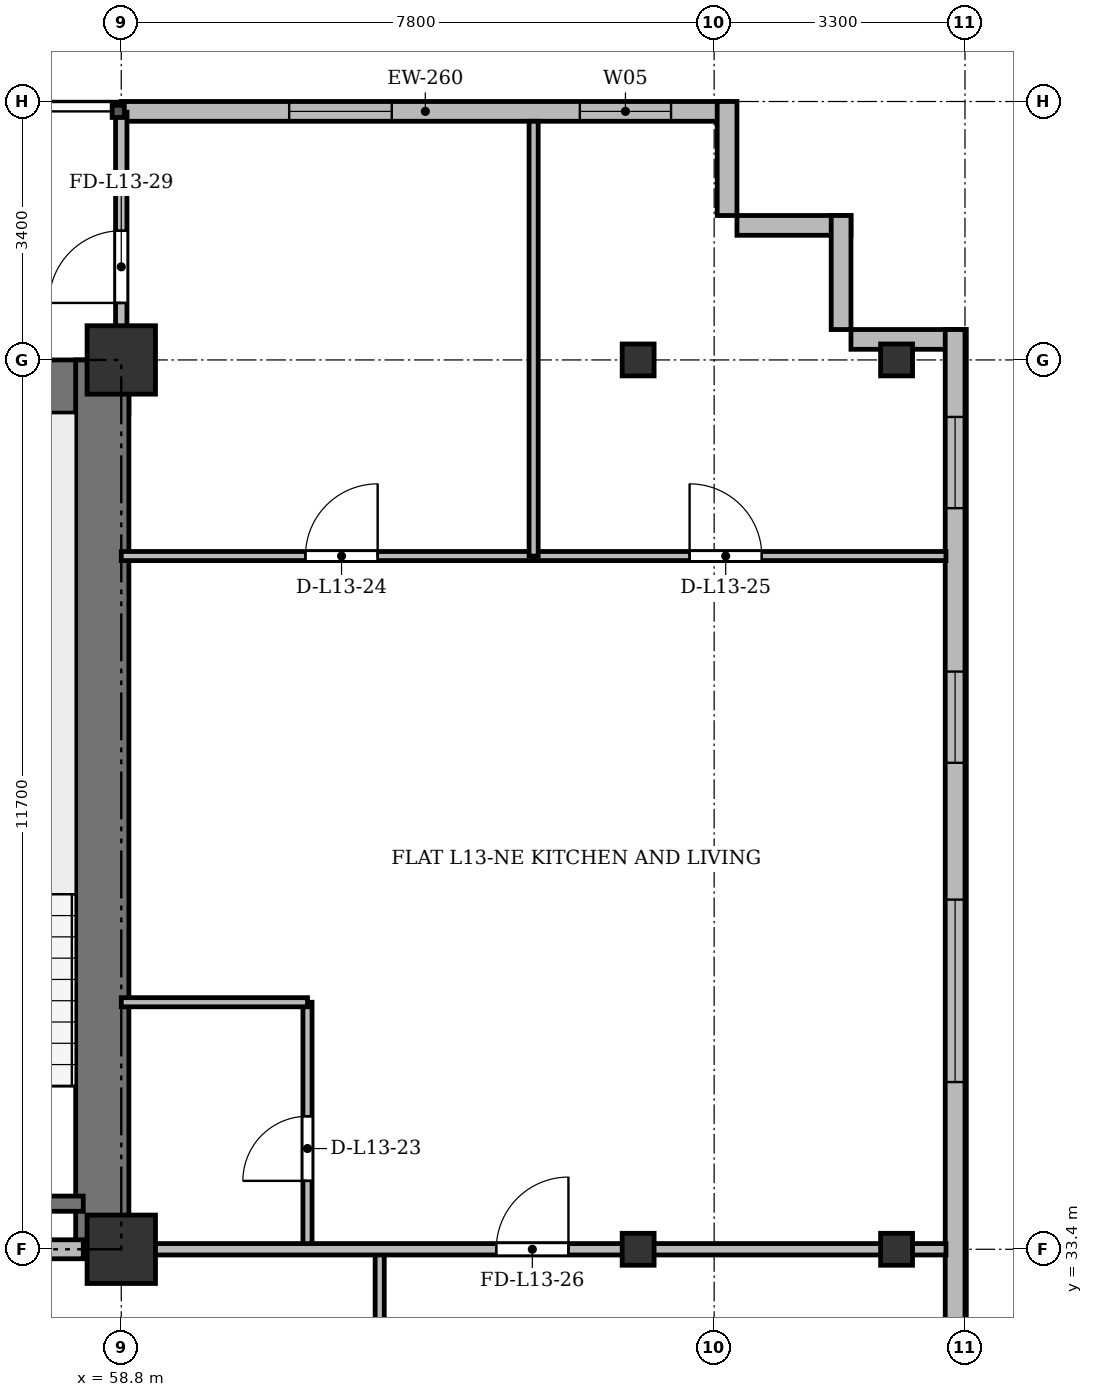
"""IFC4 building model, lengths in metres.
Left out: names, types, materials, properties, quantities, classifications, styles, units other than length and angle.
Written with IfcOpenShell. Run it as: python <this file> out.ifc"""

import sys

from ifc_helpers import new_model, si_unit, direction, frame, frame_2d, origin, origin_2d, place, context, subcontext, project, spatial, rectangle, i_section, extrude, source, transform, mapped, element, fill, save


model = new_model("IFC4")
c1 = context("Model", 3, precision=1e-05, world=origin(), true_north=direction((0.0, 1.0)))
c2 = subcontext(c1, "Body", "Model", "MODEL_VIEW")
j1 = project(units=[si_unit("LENGTHUNIT", "METRE"), si_unit("PLANEANGLEUNIT", "RADIAN")], contexts=[c1])
p1 = place(None, origin())
s1 = spatial("IfcSite", under=j1, at=p1, CompositionType="ELEMENT")
p2 = place(p1, origin())
s2 = spatial("IfcBuilding", under=s1, at=p2, CompositionType="ELEMENT")
p3 = place(p2, frame((0.0, 0.0, 52.3)))
s3 = spatial("IfcBuildingStorey", under=s2, at=p3, CompositionType="ELEMENT", Elevation=52.3)
m1 = source(origin(), c2, "Body", "SweptSolid", [
    extrude(rectangle(XDim=0.9, YDim=0.9, at=origin_2d()), origin(), (0.0, 0.0, 1.0), 3.6),
])
for number, where, z_axis, x_axis in (
    (1, (58.8, 33.4, 0.0), (0.0, 0.0, 1.0), (1.0, 0.0, 0.0)),
    (2, (58.8, 45.1, 0.0), (0.0, 0.0, 1.0), (1.0, 0.0, 0.0)),
):
    element("IfcColumn", number, at=place(p3, frame(where, z_axis=z_axis, x_axis=x_axis)), inside=s3, PredefinedType="COLUMN", context=c2, shape_type="MappedRepresentation", body=[
        mapped(m1, transform((0.0, 0.0, 0.0), x_axis=(1.0, 0.0, 0.0), y_axis=(0.0, 1.0, 0.0), z_axis=(0.0, 0.0, 1.0), scale=1.0)),
    ])
m2 = source(origin(), c2, "Body", "SweptSolid", [
    extrude(i_section(OverallWidth=0.42, OverallDepth=0.42, WebThickness=0.026, FlangeThickness=0.04, at=origin_2d()), origin(), (0.0, 0.0, 1.0), 3.6),
])
for number, where, z_axis, x_axis in (
    (3, (65.6, 33.4, 0.0), (0.0, 0.0, 1.0), (1.0, 0.0, 0.0)),
    (4, (65.6, 45.1, 0.0), (0.0, 0.0, 1.0), (1.0, 0.0, 0.0)),
    (5, (69.0, 33.4, 0.0), (0.0, 0.0, 1.0), (1.0, 0.0, 0.0)),
    (6, (69.0, 45.1, 0.0), (0.0, 0.0, 1.0), (1.0, 0.0, 0.0)),
):
    element("IfcColumn", number, at=place(p3, frame(where, z_axis=z_axis, x_axis=x_axis)), inside=s3, PredefinedType="COLUMN", context=c2, shape_type="MappedRepresentation", body=[
        mapped(m2, transform((0.0, 0.0, 0.0), x_axis=(1.0, 0.0, 0.0), y_axis=(0.0, 1.0, 0.0), z_axis=(0.0, 0.0, 1.0), scale=1.0)),
    ])
p4 = place(p3, frame((58.8, 48.37, 0.0), z_axis=(0.0, 0.0, 1.0), x_axis=(1.0, 0.0, 0.0)))
e7 = element("IfcWall", 7, at=p4, inside=s3, PredefinedType="SOLIDWALL", context=c2, shape_type="SweptSolid", body=[
    extrude(rectangle(XDim=8.0, YDim=0.26, at=frame_2d((4.0, 0.0))), origin(), (0.0, 0.0, 1.0), 3.34),
])
p5 = place(p4, frame((2.209, 0.0, 0.9)))
e8 = element("IfcOpeningElement", 8, at=p5, cuts=e7, PredefinedType="OPENING", context=c2, shape_type="SweptSolid", body=[
    extrude(rectangle(XDim=1.35, YDim=1.5, at=frame_2d((0.675, 0.75))), frame((0.0, 0.14, 0.0), z_axis=(0.0, -1.0, 0.0), x_axis=(1.0, 0.0, 0.0)), (0.0, 0.0, 1.0), 0.28),
])
p6 = place(p4, frame((6.033, 0.0, 0.9)))
e9 = element("IfcOpeningElement", 9, at=p6, cuts=e7, PredefinedType="OPENING", context=c2, shape_type="SweptSolid", body=[
    extrude(rectangle(XDim=1.2, YDim=1.65, at=frame_2d((0.6, 0.825))), frame((0.0, 0.14, 0.0), z_axis=(0.0, -1.0, 0.0), x_axis=(1.0, 0.0, 0.0)), (0.0, 0.0, 1.0), 0.28),
])
for number, where, z_axis, x_axis in (
    (10, (66.77, 48.5, 0.0), (0.0, 0.0, 1.0), (0.0, -1.0, 0.0)),
    (11, (66.9, 46.87, 0.0), (0.0, 0.0, 1.0), (1.0, 0.0, 0.0)),
    (12, (68.27, 47.0, 0.0), (0.0, 0.0, 1.0), (0.0, -1.0, 0.0)),
):
    element("IfcWall", number, at=place(p3, frame(where, z_axis=z_axis, x_axis=x_axis)), inside=s3, PredefinedType="SOLIDWALL", context=c2, shape_type="SweptSolid", body=[
        extrude(rectangle(XDim=1.5, YDim=0.26, at=frame_2d((0.75, 0.0))), origin(), (0.0, 0.0, 1.0), 3.34),
    ])
p7 = place(p3, frame((68.4, 45.37, 0.0), z_axis=(0.0, 0.0, 1.0), x_axis=(1.0, 0.0, 0.0)))
e13 = element("IfcWall", 13, at=p7, inside=s3, PredefinedType="SOLIDWALL", context=c2, shape_type="SweptSolid", body=[
    extrude(rectangle(XDim=1.5, YDim=0.26, at=frame_2d((0.75, 0.0))), origin(), (0.0, 0.0, 1.0), 2.69),
])
p8 = place(p3, frame((69.77, 45.5, 0.0), z_axis=(0.0, 0.0, 1.0), x_axis=(0.0, -1.0, 0.0)))
e14 = element("IfcWall", 14, at=p8, inside=s3, PredefinedType="SOLIDWALL", context=c2, shape_type="SweptSolid", body=[
    extrude(rectangle(XDim=39.6, YDim=0.26, at=frame_2d((19.8, 0.0))), origin(), (0.0, 0.0, 1.0), 3.34),
])
p9 = place(p8, frame((36.95, 0.0, 0.92)))
e15 = element("IfcOpeningElement", 15, at=p9, cuts=e14, PredefinedType="OPENING", context=c2, shape_type="SweptSolid", body=[
    extrude(rectangle(XDim=1.2, YDim=1.65, at=frame_2d((0.6, 0.825))), frame((0.0, 0.14, 0.0), z_axis=(0.0, -1.0, 0.0), x_axis=(1.0, 0.0, 0.0)), (0.0, 0.0, 1.0), 0.28),
])
p10 = place(p8, frame((32.9, 0.0, 0.92)))
e16 = element("IfcOpeningElement", 16, at=p10, cuts=e14, PredefinedType="OPENING", context=c2, shape_type="SweptSolid", body=[
    extrude(rectangle(XDim=2.4, YDim=2.1, at=frame_2d((1.2, 1.05))), frame((0.0, 0.14, 0.0), z_axis=(0.0, -1.0, 0.0), x_axis=(1.0, 0.0, 0.0)), (0.0, 0.0, 1.0), 0.28),
])
p11 = place(p8, frame((28.7, 0.0, 0.92)))
e17 = element("IfcOpeningElement", 17, at=p11, cuts=e14, PredefinedType="OPENING", context=c2, shape_type="SweptSolid", body=[
    extrude(rectangle(XDim=2.4, YDim=2.1, at=frame_2d((1.2, 1.05))), frame((0.0, 0.14, 0.0), z_axis=(0.0, -1.0, 0.0), x_axis=(1.0, 0.0, 0.0)), (0.0, 0.0, 1.0), 0.28),
])
p12 = place(p8, frame((21.5, 0.0, 0.92)))
e18 = element("IfcOpeningElement", 18, at=p12, cuts=e14, PredefinedType="OPENING", context=c2, shape_type="SweptSolid", body=[
    extrude(rectangle(XDim=2.4, YDim=2.1, at=frame_2d((1.2, 1.05))), frame((0.0, 0.14, 0.0), z_axis=(0.0, -1.0, 0.0), x_axis=(1.0, 0.0, 0.0)), (0.0, 0.0, 1.0), 0.28),
])
p13 = place(p8, frame((7.5, 0.0, 0.92)))
e19 = element("IfcOpeningElement", 19, at=p13, cuts=e14, PredefinedType="OPENING", context=c2, shape_type="SweptSolid", body=[
    extrude(rectangle(XDim=2.4, YDim=2.1, at=frame_2d((1.2, 1.05))), frame((0.0, 0.14, 0.0), z_axis=(0.0, -1.0, 0.0), x_axis=(1.0, 0.0, 0.0)), (0.0, 0.0, 1.0), 0.28),
])
p14 = place(p8, frame((4.5, 0.0, 0.92)))
e20 = element("IfcOpeningElement", 20, at=p14, cuts=e14, PredefinedType="OPENING", context=c2, shape_type="SweptSolid", body=[
    extrude(rectangle(XDim=1.2, YDim=1.65, at=frame_2d((0.6, 0.825))), frame((0.0, 0.14, 0.0), z_axis=(0.0, -1.0, 0.0), x_axis=(1.0, 0.0, 0.0)), (0.0, 0.0, 1.0), 0.28),
])
p15 = place(p8, frame((1.15, 0.0, 0.92)))
e21 = element("IfcOpeningElement", 21, at=p15, cuts=e14, PredefinedType="OPENING", context=c2, shape_type="SweptSolid", body=[
    extrude(rectangle(XDim=1.2, YDim=1.65, at=frame_2d((0.6, 0.825))), frame((0.0, 0.14, 0.0), z_axis=(0.0, -1.0, 0.0), x_axis=(1.0, 0.0, 0.0)), (0.0, 0.0, 1.0), 0.28),
])
p16 = place(p3, frame((15.5, 44.75, 0.0), z_axis=(0.0, 0.0, 1.0), x_axis=(1.0, 0.0, 0.0)))
e22 = element("IfcWall", 22, at=p16, inside=s3, PredefinedType="SHEAR", context=c2, shape_type="SweptSolid", body=[
    extrude(rectangle(XDim=43.4, YDim=0.7, at=frame_2d((21.7, 0.0))), origin(), (0.0, 0.0, 1.0), 3.34),
])
p17 = place(p3, frame((58.55, 33.4, 0.0), z_axis=(0.0, 0.0, 1.0), x_axis=(0.0, 1.0, 0.0)))
e23 = element("IfcWall", 23, at=p17, inside=s3, PredefinedType="SHEAR", context=c2, shape_type="SweptSolid", body=[
    extrude(rectangle(XDim=11.7, YDim=0.7, at=frame_2d((5.85, 0.0))), origin(), (0.0, 0.0, 1.0), 3.34),
])
p18 = place(p3, frame((54.9, 34.0, 0.0), z_axis=(0.0, 0.0, 1.0), x_axis=(1.0, 0.0, 0.0)))
e24 = element("IfcWall", 24, at=p18, inside=s3, PredefinedType="SHEAR", context=c2, shape_type="SweptSolid", body=[
    extrude(rectangle(XDim=3.4, YDim=0.2, at=frame_2d((1.7, 0.0))), origin(), (0.0, 0.0, 1.0), 3.34),
])
p19 = place(p3, frame((47.15, 33.4, 0.0), z_axis=(0.0, 0.0, 1.0), x_axis=(1.0, 0.0, 0.0)))
e25 = element("IfcWall", 25, at=p19, inside=s3, PredefinedType="PARTITIONING", context=c2, shape_type="SweptSolid", body=[
    extrude(rectangle(XDim=11.15, YDim=0.25, at=frame_2d((5.575, 0.0))), origin(), (0.0, 0.0, 1.0), 2.69),
])
p20 = place(p19, frame((0.7, 0.0, 0.0)))
e26 = element("IfcOpeningElement", 26, at=p20, cuts=e25, PredefinedType="OPENING", context=c2, shape_type="SweptSolid", body=[
    extrude(rectangle(XDim=0.95, YDim=2.15, at=frame_2d((0.475, 1.075))), frame((0.0, 0.135, 0.0), z_axis=(0.0, -1.0, 0.0), x_axis=(1.0, 0.0, 0.0)), (0.0, 0.0, 1.0), 0.27),
])
p21 = place(p19, frame((6.0, 0.0, 0.0)))
e27 = element("IfcOpeningElement", 27, at=p21, cuts=e25, PredefinedType="OPENING", context=c2, shape_type="SweptSolid", body=[
    extrude(rectangle(XDim=1.2, YDim=2.15, at=frame_2d((0.6, 1.075))), frame((0.0, 0.135, 0.0), z_axis=(0.0, -1.0, 0.0), x_axis=(1.0, 0.0, 0.0)), (0.0, 0.0, 1.0), 0.27),
])
p22 = place(p3, frame((62.2, 29.8, 0.0), z_axis=(0.0, 0.0, 1.0), x_axis=(0.0, 1.0, 0.0)))
e28 = element("IfcWall", 28, at=p22, inside=s3, PredefinedType="PARTITIONING", context=c2, shape_type="SweptSolid", body=[
    extrude(rectangle(XDim=3.6, YDim=0.12, at=frame_2d((1.8, 0.0))), origin(), (0.0, 0.0, 1.0), 2.69),
])
p23 = place(p3, frame((61.25, 33.4, 0.0), z_axis=(0.0, 0.0, 1.0), x_axis=(0.0, 1.0, 0.0)))
e29 = element("IfcWall", 29, at=p23, inside=s3, PredefinedType="PARTITIONING", context=c2, shape_type="SweptSolid", body=[
    extrude(rectangle(XDim=3.25, YDim=0.12, at=frame_2d((1.625, 0.0))), origin(), (0.0, 0.0, 1.0), 2.69),
])
p24 = place(p23, frame((0.9, 0.0, 0.0)))
e30 = element("IfcOpeningElement", 30, at=p24, cuts=e29, PredefinedType="OPENING", context=c2, shape_type="SweptSolid", body=[
    extrude(rectangle(XDim=0.85, YDim=2.1, at=frame_2d((0.425, 1.05))), frame((0.0, 0.07, 0.0), z_axis=(0.0, -1.0, 0.0), x_axis=(1.0, 0.0, 0.0)), (0.0, 0.0, 1.0), 0.14),
])
p25 = place(p3, frame((58.8, 36.65, 0.0), z_axis=(0.0, 0.0, 1.0), x_axis=(1.0, 0.0, 0.0)))
e31 = element("IfcWall", 31, at=p25, inside=s3, PredefinedType="PARTITIONING", context=c2, shape_type="SweptSolid", body=[
    extrude(rectangle(XDim=2.45, YDim=0.12, at=frame_2d((1.225, 0.0))), origin(), (0.0, 0.0, 1.0), 2.752),
])
p26 = place(p3, frame((58.8, 42.52, 0.0), z_axis=(0.0, 0.0, 1.0), x_axis=(1.0, 0.0, 0.0)))
e32 = element("IfcWall", 32, at=p26, inside=s3, PredefinedType="PARTITIONING", context=c2, shape_type="SweptSolid", body=[
    extrude(rectangle(XDim=5.425, YDim=0.12, at=frame_2d((2.712, 0.0))), origin(), (0.0, 0.0, 1.0), 2.752),
])
p27 = place(p26, frame((2.423, 0.0, 0.0)))
e33 = element("IfcOpeningElement", 33, at=p27, cuts=e32, PredefinedType="OPENING", context=c2, shape_type="SweptSolid", body=[
    extrude(rectangle(XDim=0.95, YDim=2.15, at=frame_2d((0.475, 1.075))), frame((0.0, 0.07, 0.0), z_axis=(0.0, -1.0, 0.0), x_axis=(1.0, 0.0, 0.0)), (0.0, 0.0, 1.0), 0.14),
])
p28 = place(p3, frame((64.225, 42.52, 0.0), z_axis=(0.0, 0.0, 1.0), x_axis=(1.0, 0.0, 0.0)))
e34 = element("IfcWall", 34, at=p28, inside=s3, PredefinedType="PARTITIONING", context=c2, shape_type="SweptSolid", body=[
    extrude(rectangle(XDim=5.425, YDim=0.12, at=frame_2d((2.712, 0.0))), origin(), (0.0, 0.0, 1.0), 2.752),
])
p29 = place(p28, frame((2.052, 0.0, 0.0)))
e35 = element("IfcOpeningElement", 35, at=p29, cuts=e34, PredefinedType="OPENING", context=c2, shape_type="SweptSolid", body=[
    extrude(rectangle(XDim=0.95, YDim=2.15, at=frame_2d((0.475, 1.075))), frame((0.0, 0.07, 0.0), z_axis=(0.0, -1.0, 0.0), x_axis=(1.0, 0.0, 0.0)), (0.0, 0.0, 1.0), 0.14),
])
p30 = place(p3, frame((64.225, 42.52, 0.0), z_axis=(0.0, 0.0, 1.0), x_axis=(0.0, 1.0, 0.0)))
e36 = element("IfcWall", 36, at=p30, inside=s3, PredefinedType="PARTITIONING", context=c2, shape_type="SweptSolid", body=[
    extrude(rectangle(XDim=5.72, YDim=0.12, at=frame_2d((2.86, 0.0))), origin(), (0.0, 0.0, 1.0), 2.69),
])
p31 = place(p3, frame((58.8, 33.4, 0.0), z_axis=(0.0, 0.0, 1.0), x_axis=(1.0, 0.0, 0.0)))
e37 = element("IfcWall", 37, at=p31, inside=s3, PredefinedType="PARTITIONING", context=c2, shape_type="SweptSolid", body=[
    extrude(rectangle(XDim=10.85, YDim=0.15, at=frame_2d((5.425, 0.0))), origin(), (0.0, 0.0, 1.0), 2.69),
])
p32 = place(p31, frame((4.933, 0.0, 0.0)))
e38 = element("IfcOpeningElement", 38, at=p32, cuts=e37, PredefinedType="OPENING", context=c2, shape_type="SweptSolid", body=[
    extrude(rectangle(XDim=0.95, YDim=2.15, at=frame_2d((0.475, 1.075))), frame((0.0, 0.085, 0.0), z_axis=(0.0, -1.0, 0.0), x_axis=(1.0, 0.0, 0.0)), (0.0, 0.0, 1.0), 0.17),
])
p33 = place(p3, frame((58.8, 44.75, 0.0), z_axis=(0.0, 0.0, 1.0), x_axis=(0.0, 1.0, 0.0)))
e39 = element("IfcWall", 39, at=p33, inside=s3, PredefinedType="PARTITIONING", context=c2, shape_type="SweptSolid", body=[
    extrude(rectangle(XDim=3.61, YDim=0.15, at=frame_2d((1.805, 0.0))), origin(), (0.0, 0.0, 1.0), 2.752),
])
p34 = place(p33, frame((1.1, 0.0, 0.0)))
e40 = element("IfcOpeningElement", 40, at=p34, cuts=e39, PredefinedType="OPENING", context=c2, shape_type="SweptSolid", body=[
    extrude(rectangle(XDim=0.95, YDim=2.15, at=frame_2d((0.475, 1.075))), frame((0.0, 0.085, 0.0), z_axis=(0.0, -1.0, 0.0), x_axis=(1.0, 0.0, 0.0)), (0.0, 0.0, 1.0), 0.17),
])
m3 = source(origin(), c2, "Body", "SweptSolid", [
    extrude(rectangle(XDim=1.35, YDim=1.5, at=frame_2d((0.675, 0.75))), frame((0.0, 0.03, 0.0), z_axis=(0.0, -1.0, 0.0), x_axis=(1.0, 0.0, 0.0)), (0.0, 0.0, 1.0), 0.06),
])
p35 = place(p5, origin())
e41 = element("IfcWindow", 41, at=p35, inside=s3, PartitioningType="SINGLE_PANEL", PredefinedType="WINDOW", context=c2, shape_type="MappedRepresentation", body=[
    mapped(m3, transform((0.0, 0.0, 0.0), x_axis=(1.0, 0.0, 0.0), y_axis=(0.0, 1.0, 0.0), z_axis=(0.0, 0.0, 1.0), scale=1.0)),
])
fill(e8, e41)
m4 = source(origin(), c2, "Body", "SweptSolid", [
    extrude(rectangle(XDim=1.2, YDim=1.65, at=frame_2d((0.6, 0.825))), frame((0.0, 0.03, 0.0), z_axis=(0.0, -1.0, 0.0), x_axis=(1.0, 0.0, 0.0)), (0.0, 0.0, 1.0), 0.06),
])
p36 = place(p6, origin())
e42 = element("IfcWindow", 42, at=p36, inside=s3, PartitioningType="SINGLE_PANEL", PredefinedType="WINDOW", context=c2, shape_type="MappedRepresentation", body=[
    mapped(m4, transform((0.0, 0.0, 0.0), x_axis=(1.0, 0.0, 0.0), y_axis=(0.0, 1.0, 0.0), z_axis=(0.0, 0.0, 1.0), scale=1.0)),
])
fill(e9, e42)
m5 = source(origin(), c2, "Body", "SweptSolid", [
    extrude(rectangle(XDim=2.4, YDim=2.1, at=frame_2d((1.2, 1.05))), frame((0.0, 0.03, 0.0), z_axis=(0.0, -1.0, 0.0), x_axis=(1.0, 0.0, 0.0)), (0.0, 0.0, 1.0), 0.06),
])
p37 = place(p13, origin())
e43 = element("IfcWindow", 43, at=p37, inside=s3, PartitioningType="SINGLE_PANEL", PredefinedType="WINDOW", context=c2, shape_type="MappedRepresentation", body=[
    mapped(m5, transform((0.0, 0.0, 0.0), x_axis=(1.0, 0.0, 0.0), y_axis=(0.0, 1.0, 0.0), z_axis=(0.0, 0.0, 1.0), scale=1.0)),
])
fill(e19, e43)
p38 = place(p14, origin())
e44 = element("IfcWindow", 44, at=p38, inside=s3, PartitioningType="SINGLE_PANEL", PredefinedType="WINDOW", context=c2, shape_type="MappedRepresentation", body=[
    mapped(m4, transform((0.0, 0.0, 0.0), x_axis=(1.0, 0.0, 0.0), y_axis=(0.0, 1.0, 0.0), z_axis=(0.0, 0.0, 1.0), scale=1.0)),
])
fill(e20, e44)
p39 = place(p15, origin())
e45 = element("IfcWindow", 45, at=p39, inside=s3, PartitioningType="SINGLE_PANEL", PredefinedType="WINDOW", context=c2, shape_type="MappedRepresentation", body=[
    mapped(m4, transform((0.0, 0.0, 0.0), x_axis=(1.0, 0.0, 0.0), y_axis=(0.0, 1.0, 0.0), z_axis=(0.0, 0.0, 1.0), scale=1.0)),
])
fill(e21, e45)
m6 = source(origin(), c2, "Body", "SweptSolid", [
    extrude(rectangle(XDim=0.85, YDim=2.1, at=frame_2d((0.425, 1.05))), frame((0.0, 0.025, 0.0), z_axis=(0.0, -1.0, 0.0), x_axis=(1.0, 0.0, 0.0)), (0.0, 0.0, 1.0), 0.05),
])
p40 = place(p24, origin())
e46 = element("IfcDoor", 46, at=p40, inside=s3, OperationType="SINGLE_SWING_LEFT", PredefinedType="DOOR", context=c2, shape_type="MappedRepresentation", body=[
    mapped(m6, transform((0.0, 0.0, 0.0), x_axis=(1.0, 0.0, 0.0), y_axis=(0.0, 1.0, 0.0), z_axis=(0.0, 0.0, 1.0), scale=1.0)),
])
fill(e30, e46)
m7 = source(origin(), c2, "Body", "SweptSolid", [
    extrude(rectangle(XDim=0.95, YDim=2.15, at=frame_2d((0.475, 1.075))), frame((0.0, 0.025, 0.0), z_axis=(0.0, -1.0, 0.0), x_axis=(1.0, 0.0, 0.0)), (0.0, 0.0, 1.0), 0.05),
])
p41 = place(p27, origin())
e47 = element("IfcDoor", 47, at=p41, inside=s3, OperationType="SINGLE_SWING_RIGHT", PredefinedType="DOOR", context=c2, shape_type="MappedRepresentation", body=[
    mapped(m7, transform((0.0, 0.0, 0.0), x_axis=(1.0, 0.0, 0.0), y_axis=(0.0, 1.0, 0.0), z_axis=(0.0, 0.0, 1.0), scale=1.0)),
])
fill(e33, e47)
p42 = place(p29, origin())
e48 = element("IfcDoor", 48, at=p42, inside=s3, OperationType="SINGLE_SWING_LEFT", PredefinedType="DOOR", context=c2, shape_type="MappedRepresentation", body=[
    mapped(m7, transform((0.0, 0.0, 0.0), x_axis=(1.0, 0.0, 0.0), y_axis=(0.0, 1.0, 0.0), z_axis=(0.0, 0.0, 1.0), scale=1.0)),
])
fill(e35, e48)
p43 = place(p32, origin())
e49 = element("IfcDoor", 49, at=p43, inside=s3, OperationType="SINGLE_SWING_RIGHT", PredefinedType="DOOR", context=c2, shape_type="MappedRepresentation", body=[
    mapped(m7, transform((0.0, 0.0, 0.0), x_axis=(1.0, 0.0, 0.0), y_axis=(0.0, 1.0, 0.0), z_axis=(0.0, 0.0, 1.0), scale=1.0)),
])
fill(e38, e49)
p44 = place(p34, origin())
e50 = element("IfcDoor", 50, at=p44, inside=s3, OperationType="SINGLE_SWING_LEFT", PredefinedType="DOOR", context=c2, shape_type="MappedRepresentation", body=[
    mapped(m7, transform((0.0, 0.0, 0.0), x_axis=(1.0, 0.0, 0.0), y_axis=(0.0, 1.0, 0.0), z_axis=(0.0, 0.0, 1.0), scale=1.0)),
])
fill(e40, e50)
save(model, sys.argv[1])
